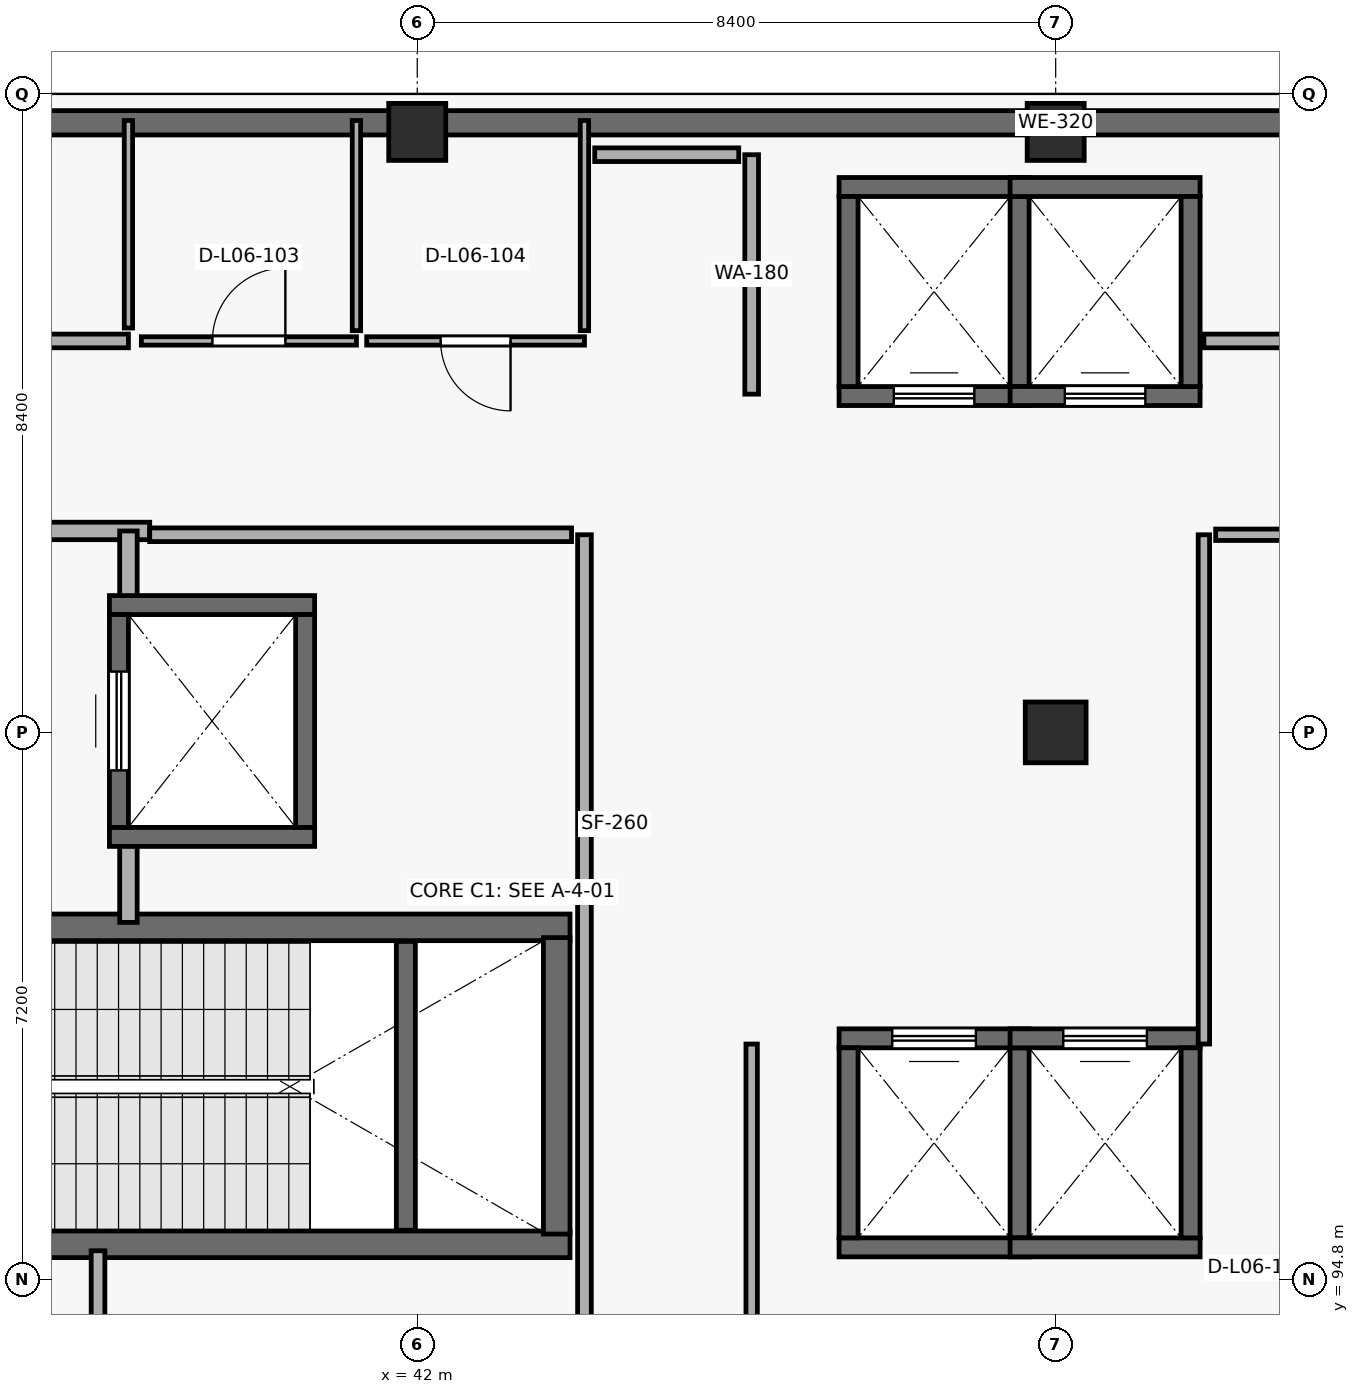
"""IFC4 building model, lengths in metres.
Left out: names, types, materials, properties, quantities, classifications, styles, units other than length and angle.
Written with IfcOpenShell. Run it as: python <this file> out.ifc"""

import sys

from ifc_helpers import new_model, si_unit, direction, frame, frame_2d, origin, origin_2d, place, context, subcontext, project, spatial, rectangle, extrude, element, fill, save


model = new_model("IFC4")
c1 = context("Model", 3, precision=1e-05, world=origin(), true_north=direction((0.0, 1.0)))
c2 = subcontext(c1, "Body", "Model", "MODEL_VIEW")
j1 = project(units=[si_unit("LENGTHUNIT", "METRE"), si_unit("PLANEANGLEUNIT", "RADIAN")], contexts=[c1])
p1 = place(None, origin())
s1 = spatial("IfcSite", under=j1, at=p1, CompositionType="ELEMENT")
p2 = place(p1, origin())
s2 = spatial("IfcBuilding", under=s1, at=p2, CompositionType="ELEMENT")
p3 = place(p2, frame((0.0, 0.0, 25.5)))
s3 = spatial("IfcBuildingStorey", under=s2, at=p3, CompositionType="ELEMENT", Elevation=25.5)
p4 = place(p3, frame((42.0, 109.9, 0.0), z_axis=(0.0, 0.0, 1.0), x_axis=(1.0, 0.0, 0.0)))
e1 = element("IfcColumn", 1, at=p4, inside=s3, PredefinedType="COLUMN", context=c2, shape_type="SweptSolid", body=[
    extrude(rectangle(XDim=0.75, YDim=0.75, at=origin_2d()), origin(), (0.0, 0.0, 1.0), 5.1),
])
p5 = place(p3, frame((50.4, 102.0, 0.0), z_axis=(0.0, 0.0, 1.0), x_axis=(1.0, 0.0, 0.0)))
e2 = element("IfcColumn", 2, at=p5, inside=s3, PredefinedType="COLUMN", context=c2, shape_type="SweptSolid", body=[
    extrude(rectangle(XDim=0.8, YDim=0.8, at=origin_2d()), origin(), (0.0, 0.0, 1.0), 5.1),
])
p6 = place(p3, frame((50.4, 109.9, 0.0), z_axis=(0.0, 0.0, 1.0), x_axis=(1.0, 0.0, 0.0)))
e3 = element("IfcColumn", 3, at=p6, inside=s3, PredefinedType="COLUMN", context=c2, shape_type="SweptSolid", body=[
    extrude(rectangle(XDim=0.75, YDim=0.75, at=origin_2d()), origin(), (0.0, 0.0, 1.0), 5.1),
])
p7 = place(p3, frame((33.6, 110.02, 0.0), z_axis=(0.0, 0.0, 1.0), x_axis=(1.0, 0.0, 0.0)))
e4 = element("IfcWall", 4, at=p7, inside=s3, PredefinedType="SOLIDWALL", context=c2, shape_type="SweptSolid", body=[
    extrude(rectangle(XDim=33.6, YDim=0.32, at=frame_2d((16.8, 0.0))), origin(), (0.0, 0.0, 1.0), 4.82),
])
p8 = place(p3, frame((34.79, 95.265, 0.0), z_axis=(0.0, 0.0, 1.0), x_axis=(1.0, 0.0, 0.0)))
e5 = element("IfcWall", 5, at=p8, inside=s3, PredefinedType="SHEAR", context=c2, shape_type="SweptSolid", body=[
    extrude(rectangle(XDim=9.22, YDim=0.35, at=frame_2d((4.61, 0.0))), origin(), (0.0, 0.0, 1.0), 4.82),
])
p9 = place(p8, frame((0.45, 0.0, 0.0)))
e6 = element("IfcOpeningElement", 6, at=p9, cuts=e5, PredefinedType="OPENING", context=c2, shape_type="SweptSolid", body=[
    extrude(rectangle(XDim=1.25, YDim=2.2, at=frame_2d((0.625, 1.1))), frame((0.0, 0.185, 0.0), z_axis=(0.0, -1.0, 0.0), x_axis=(1.0, 0.0, 0.0)), (0.0, 0.0, 1.0), 0.37),
])
p10 = place(p3, frame((44.01, 99.435, 0.0), z_axis=(0.0, 0.0, 1.0), x_axis=(-1.0, 0.0, 0.0)))
e7 = element("IfcWall", 7, at=p10, inside=s3, PredefinedType="SHEAR", context=c2, shape_type="SweptSolid", body=[
    extrude(rectangle(XDim=9.22, YDim=0.35, at=frame_2d((4.61, 0.0))), origin(), (0.0, 0.0, 1.0), 4.82),
])
p11 = place(p10, frame((7.72, 0.0, 0.0)))
e8 = element("IfcOpeningElement", 8, at=p11, cuts=e7, PredefinedType="OPENING", context=c2, shape_type="SweptSolid", body=[
    extrude(rectangle(XDim=1.2, YDim=2.2, at=frame_2d((0.6, 1.1))), frame((0.0, 0.185, 0.0), z_axis=(0.0, -1.0, 0.0), x_axis=(1.0, 0.0, 0.0)), (0.0, 0.0, 1.0), 0.37),
])
p12 = place(p3, frame((43.835, 99.3, 0.0), z_axis=(0.0, 0.0, 1.0), x_axis=(0.0, -1.0, 0.0)))
e9 = element("IfcWall", 9, at=p12, inside=s3, PredefinedType="SHEAR", context=c2, shape_type="SweptSolid", body=[
    extrude(rectangle(XDim=3.9, YDim=0.35, at=frame_2d((1.95, 0.0))), origin(), (0.0, 0.0, 1.0), 4.82),
])
p13 = place(p3, frame((41.85, 95.45, 0.0), z_axis=(0.0, 0.0, 1.0), x_axis=(0.0, 1.0, 0.0)))
e10 = element("IfcWall", 10, at=p13, inside=s3, PredefinedType="SHEAR", context=c2, shape_type="SweptSolid", body=[
    extrude(rectangle(XDim=3.8, YDim=0.25, at=frame_2d((1.9, 0.0))), origin(), (0.0, 0.0, 1.0), 2.37),
])
p14 = place(p3, frame((34.59, 104.65, 0.0), z_axis=(0.0, 0.0, 1.0), x_axis=(1.0, 0.0, 0.0)))
e11 = element("IfcWall", 11, at=p14, inside=s3, PredefinedType="PARTITIONING", context=c2, shape_type="SweptSolid", body=[
    extrude(rectangle(XDim=3.89, YDim=0.23, at=frame_2d((1.945, 0.0))), origin(), (0.0, 0.0, 1.0), 4.82),
])
p15 = place(p14, frame((1.15, 0.0, 0.0)))
e12 = element("IfcOpeningElement", 12, at=p15, cuts=e11, PredefinedType="OPENING", context=c2, shape_type="SweptSolid", body=[
    extrude(rectangle(XDim=1.2, YDim=2.2, at=frame_2d((0.6, 1.1))), frame((0.0, 0.125, 0.0), z_axis=(0.0, -1.0, 0.0), x_axis=(1.0, 0.0, 0.0)), (0.0, 0.0, 1.0), 0.25),
])
p16 = place(p3, frame((38.2, 104.65, 0.0), z_axis=(0.0, 0.0, 1.0), x_axis=(0.0, -1.0, 0.0)))
e13 = element("IfcWall", 13, at=p16, inside=s3, PredefinedType="PARTITIONING", context=c2, shape_type="SweptSolid", body=[
    extrude(rectangle(XDim=1.1, YDim=0.23, at=frame_2d((0.55, 0.0))), origin(), (0.0, 0.0, 1.0), 4.82),
])
p17 = place(p3, frame((38.2, 100.75, 0.0), z_axis=(0.0, 0.0, 1.0), x_axis=(0.0, -1.0, 0.0)))
e14 = element("IfcWall", 14, at=p17, inside=s3, PredefinedType="PARTITIONING", context=c2, shape_type="SweptSolid", body=[
    extrude(rectangle(XDim=1.25, YDim=0.23, at=frame_2d((0.625, 0.0))), origin(), (0.0, 0.0, 1.0), 4.82),
])
p18 = place(p3, frame((47.55, 95.225, 0.0), z_axis=(0.0, 0.0, 1.0), x_axis=(1.0, 0.0, 0.0)))
e15 = element("IfcWall", 15, at=p18, inside=s3, PredefinedType="SHEAR", context=c2, shape_type="SweptSolid", body=[
    extrude(rectangle(XDim=2.5, YDim=0.25, at=frame_2d((1.25, 0.0))), origin(), (0.0, 0.0, 1.0), 4.82),
])
p19 = place(p3, frame((50.05, 97.975, 0.0), z_axis=(0.0, 0.0, 1.0), x_axis=(-1.0, 0.0, 0.0)))
e16 = element("IfcWall", 16, at=p19, inside=s3, PredefinedType="SHEAR", context=c2, shape_type="SweptSolid", body=[
    extrude(rectangle(XDim=2.5, YDim=0.25, at=frame_2d((1.25, 0.0))), origin(), (0.0, 0.0, 1.0), 4.82),
])
p20 = place(p19, frame((0.7, 0.0, 0.0)))
e17 = element("IfcOpeningElement", 17, at=p20, cuts=e16, PredefinedType="OPENING", context=c2, shape_type="SweptSolid", body=[
    extrude(rectangle(XDim=1.1, YDim=2.2, at=frame_2d((0.55, 1.1))), frame((0.0, 0.135, 0.0), z_axis=(0.0, -1.0, 0.0), x_axis=(1.0, 0.0, 0.0)), (0.0, 0.0, 1.0), 0.27),
])
for number, where, z_axis, x_axis in (
    (18, (47.675, 95.35, 0.0), (0.0, 0.0, 1.0), (0.0, 1.0, 0.0)),
    (19, (49.925, 97.85, 0.0), (0.0, 0.0, 1.0), (0.0, -1.0, 0.0)),
    (20, (49.8, 95.225, 0.0), (0.0, 0.0, 1.0), (1.0, 0.0, 0.0)),
):
    element("IfcWall", number, at=place(p3, frame(where, z_axis=z_axis, x_axis=x_axis)), inside=s3, PredefinedType="SHEAR", context=c2, shape_type="SweptSolid", body=[
        extrude(rectangle(XDim=2.5, YDim=0.25, at=frame_2d((1.25, 0.0))), origin(), (0.0, 0.0, 1.0), 4.82),
    ])
p21 = place(p3, frame((52.3, 97.975, 0.0), z_axis=(0.0, 0.0, 1.0), x_axis=(-1.0, 0.0, 0.0)))
e21 = element("IfcWall", 21, at=p21, inside=s3, PredefinedType="SHEAR", context=c2, shape_type="SweptSolid", body=[
    extrude(rectangle(XDim=2.5, YDim=0.25, at=frame_2d((1.25, 0.0))), origin(), (0.0, 0.0, 1.0), 4.82),
])
p22 = place(p21, frame((0.7, 0.0, 0.0)))
e22 = element("IfcOpeningElement", 22, at=p22, cuts=e21, PredefinedType="OPENING", context=c2, shape_type="SweptSolid", body=[
    extrude(rectangle(XDim=1.1, YDim=2.2, at=frame_2d((0.55, 1.1))), frame((0.0, 0.135, 0.0), z_axis=(0.0, -1.0, 0.0), x_axis=(1.0, 0.0, 0.0)), (0.0, 0.0, 1.0), 0.27),
])
p23 = place(p3, frame((52.175, 97.85, 0.0), z_axis=(0.0, 0.0, 1.0), x_axis=(0.0, -1.0, 0.0)))
e23 = element("IfcWall", 23, at=p23, inside=s3, PredefinedType="SHEAR", context=c2, shape_type="SweptSolid", body=[
    extrude(rectangle(XDim=2.5, YDim=0.25, at=frame_2d((1.25, 0.0))), origin(), (0.0, 0.0, 1.0), 4.82),
])
p24 = place(p3, frame((47.55, 106.425, 0.0), z_axis=(0.0, 0.0, 1.0), x_axis=(1.0, 0.0, 0.0)))
e24 = element("IfcWall", 24, at=p24, inside=s3, PredefinedType="SHEAR", context=c2, shape_type="SweptSolid", body=[
    extrude(rectangle(XDim=2.5, YDim=0.25, at=frame_2d((1.25, 0.0))), origin(), (0.0, 0.0, 1.0), 4.82),
])
p25 = place(p24, frame((0.72, 0.0, 0.0)))
e25 = element("IfcOpeningElement", 25, at=p25, cuts=e24, PredefinedType="OPENING", context=c2, shape_type="SweptSolid", body=[
    extrude(rectangle(XDim=1.06, YDim=2.2, at=frame_2d((0.53, 1.1))), frame((0.0, 0.135, 0.0), z_axis=(0.0, -1.0, 0.0), x_axis=(1.0, 0.0, 0.0)), (0.0, 0.0, 1.0), 0.27),
])
for number, where, z_axis, x_axis in (
    (26, (50.05, 109.175, 0.0), (0.0, 0.0, 1.0), (-1.0, 0.0, 0.0)),
    (27, (47.675, 106.55, 0.0), (0.0, 0.0, 1.0), (0.0, 1.0, 0.0)),
    (28, (49.925, 109.05, 0.0), (0.0, 0.0, 1.0), (0.0, -1.0, 0.0)),
):
    element("IfcWall", number, at=place(p3, frame(where, z_axis=z_axis, x_axis=x_axis)), inside=s3, PredefinedType="SHEAR", context=c2, shape_type="SweptSolid", body=[
        extrude(rectangle(XDim=2.5, YDim=0.25, at=frame_2d((1.25, 0.0))), origin(), (0.0, 0.0, 1.0), 4.82),
    ])
p26 = place(p3, frame((49.8, 106.425, 0.0), z_axis=(0.0, 0.0, 1.0), x_axis=(1.0, 0.0, 0.0)))
e29 = element("IfcWall", 29, at=p26, inside=s3, PredefinedType="SHEAR", context=c2, shape_type="SweptSolid", body=[
    extrude(rectangle(XDim=2.5, YDim=0.25, at=frame_2d((1.25, 0.0))), origin(), (0.0, 0.0, 1.0), 4.82),
])
p27 = place(p26, frame((0.72, 0.0, 0.0)))
e30 = element("IfcOpeningElement", 30, at=p27, cuts=e29, PredefinedType="OPENING", context=c2, shape_type="SweptSolid", body=[
    extrude(rectangle(XDim=1.06, YDim=2.2, at=frame_2d((0.53, 1.1))), frame((0.0, 0.135, 0.0), z_axis=(0.0, -1.0, 0.0), x_axis=(1.0, 0.0, 0.0)), (0.0, 0.0, 1.0), 0.27),
])
for number, where, z_axis, x_axis in (
    (31, (52.3, 109.175, 0.0), (0.0, 0.0, 1.0), (-1.0, 0.0, 0.0)),
    (32, (52.175, 109.05, 0.0), (0.0, 0.0, 1.0), (0.0, -1.0, 0.0)),
):
    element("IfcWall", number, at=place(p3, frame(where, z_axis=z_axis, x_axis=x_axis)), inside=s3, PredefinedType="SHEAR", context=c2, shape_type="SweptSolid", body=[
        extrude(rectangle(XDim=2.5, YDim=0.25, at=frame_2d((1.25, 0.0))), origin(), (0.0, 0.0, 1.0), 4.82),
    ])
for number, where, z_axis, x_axis in (
    (33, (37.95, 100.625, 0.0), (0.0, 0.0, 1.0), (1.0, 0.0, 0.0)),
    (34, (40.65, 103.675, 0.0), (0.0, 0.0, 1.0), (-1.0, 0.0, 0.0)),
):
    element("IfcWall", number, at=place(p3, frame(where, z_axis=z_axis, x_axis=x_axis)), inside=s3, PredefinedType="SHEAR", context=c2, shape_type="SweptSolid", body=[
        extrude(rectangle(XDim=2.7, YDim=0.25, at=frame_2d((1.35, 0.0))), origin(), (0.0, 0.0, 1.0), 4.82),
    ])
p28 = place(p3, frame((38.075, 100.75, 0.0), z_axis=(0.0, 0.0, 1.0), x_axis=(0.0, 1.0, 0.0)))
e35 = element("IfcWall", 35, at=p28, inside=s3, PredefinedType="SHEAR", context=c2, shape_type="SweptSolid", body=[
    extrude(rectangle(XDim=2.8, YDim=0.25, at=frame_2d((1.4, 0.0))), origin(), (0.0, 0.0, 1.0), 4.82),
])
p29 = place(p28, frame((0.75, 0.0, 0.0)))
e36 = element("IfcOpeningElement", 36, at=p29, cuts=e35, PredefinedType="OPENING", context=c2, shape_type="SweptSolid", body=[
    extrude(rectangle(XDim=1.3, YDim=2.25, at=frame_2d((0.65, 1.125))), frame((0.0, 0.135, 0.0), z_axis=(0.0, -1.0, 0.0), x_axis=(1.0, 0.0, 0.0)), (0.0, 0.0, 1.0), 0.27),
])
p30 = place(p3, frame((40.525, 103.55, 0.0), z_axis=(0.0, 0.0, 1.0), x_axis=(0.0, -1.0, 0.0)))
e37 = element("IfcWall", 37, at=p30, inside=s3, PredefinedType="SHEAR", context=c2, shape_type="SweptSolid", body=[
    extrude(rectangle(XDim=2.8, YDim=0.25, at=frame_2d((1.4, 0.0))), origin(), (0.0, 0.0, 1.0), 4.82),
])
p31 = place(p3, frame((64.35, 107.15, 0.0), z_axis=(0.0, 0.0, 1.0), x_axis=(-1.0, 0.0, 0.0)))
e38 = element("IfcWall", 38, at=p31, inside=s3, PredefinedType="PARTITIONING", context=c2, shape_type="SweptSolid", body=[
    extrude(rectangle(XDim=12.0, YDim=0.18, at=frame_2d((6.0, 0.0))), origin(), (0.0, 0.0, 1.0), 4.82),
])
p32 = place(p3, frame((44.2, 104.6, 0.0), z_axis=(0.0, 0.0, 1.0), x_axis=(0.0, -1.0, 0.0)))
e39 = element("IfcWall", 39, at=p32, inside=s3, PredefinedType="PARTITIONING", context=c2, shape_type="SweptSolid", body=[
    extrude(rectangle(XDim=10.75, YDim=0.18, at=frame_2d((5.375, 0.0))), origin(), (0.0, 0.0, 1.0), 4.82),
])
p33 = place(p3, frame((52.35, 97.9, 0.0), z_axis=(0.0, 0.0, 1.0), x_axis=(0.0, 1.0, 0.0)))
e40 = element("IfcWall", 40, at=p33, inside=s3, PredefinedType="PARTITIONING", context=c2, shape_type="SweptSolid", body=[
    extrude(rectangle(XDim=6.7, YDim=0.15, at=frame_2d((3.35, 0.0))), origin(), (0.0, 0.0, 1.0), 4.82),
])
p34 = place(p3, frame((38.48, 104.6, 0.0), z_axis=(0.0, 0.0, 1.0), x_axis=(1.0, 0.0, 0.0)))
e41 = element("IfcWall", 41, at=p34, inside=s3, PredefinedType="PARTITIONING", context=c2, shape_type="SweptSolid", body=[
    extrude(rectangle(XDim=5.55, YDim=0.18, at=frame_2d((2.775, 0.0))), origin(), (0.0, 0.0, 1.0), 4.82),
])
p35 = place(p3, frame((46.4, 94.005, 0.0), z_axis=(0.0, 0.0, 1.0), x_axis=(0.0, 1.0, 0.0)))
e42 = element("IfcWall", 42, at=p35, inside=s3, PredefinedType="PARTITIONING", context=c2, shape_type="SweptSolid", body=[
    extrude(rectangle(XDim=3.895, YDim=0.15, at=frame_2d((1.948, 0.0))), origin(), (0.0, 0.0, 1.0), 4.82),
])
p36 = place(p3, frame((38.2, 107.15, 0.0), z_axis=(0.0, 0.0, 1.0), x_axis=(-1.0, 0.0, 0.0)))
e43 = element("IfcWall", 43, at=p36, inside=s3, PredefinedType="PARTITIONING", context=c2, shape_type="SweptSolid", body=[
    extrude(rectangle(XDim=3.6, YDim=0.18, at=frame_2d((1.8, 0.0))), origin(), (0.0, 0.0, 1.0), 4.82),
])
p37 = place(p3, frame((46.4, 106.45, 0.0), z_axis=(0.0, 0.0, 1.0), x_axis=(0.0, 1.0, 0.0)))
e44 = element("IfcWall", 44, at=p37, inside=s3, PredefinedType="PARTITIONING", context=c2, shape_type="SweptSolid", body=[
    extrude(rectangle(XDim=3.15, YDim=0.18, at=frame_2d((1.575, 0.0))), origin(), (0.0, 0.0, 1.0), 4.82),
])
p38 = place(p3, frame((41.2, 107.15, 0.0), z_axis=(0.0, 0.0, 1.0), x_axis=(-1.0, 0.0, 0.0)))
e45 = element("IfcWall", 45, at=p38, inside=s3, PredefinedType="PARTITIONING", context=c2, shape_type="SweptSolid", body=[
    extrude(rectangle(XDim=2.83, YDim=0.11, at=frame_2d((1.415, 0.0))), origin(), (0.0, 0.0, 1.0), 4.82),
])
p39 = place(p38, frame((0.935, 0.0, 0.0)))
e46 = element("IfcOpeningElement", 46, at=p39, cuts=e45, PredefinedType="OPENING", context=c2, shape_type="SweptSolid", body=[
    extrude(rectangle(XDim=0.96, YDim=2.14, at=frame_2d((0.48, 1.07))), frame((0.0, 0.065, 0.0), z_axis=(0.0, -1.0, 0.0), x_axis=(1.0, 0.0, 0.0)), (0.0, 0.0, 1.0), 0.13),
])
p40 = place(p3, frame((44.2, 107.15, 0.0), z_axis=(0.0, 0.0, 1.0), x_axis=(-1.0, 0.0, 0.0)))
e47 = element("IfcWall", 47, at=p40, inside=s3, PredefinedType="PARTITIONING", context=c2, shape_type="SweptSolid", body=[
    extrude(rectangle(XDim=2.865, YDim=0.11, at=frame_2d((1.433, 0.0))), origin(), (0.0, 0.0, 1.0), 4.82),
])
p41 = place(p40, frame((0.972, 0.0, 0.0)))
e48 = element("IfcOpeningElement", 48, at=p41, cuts=e47, PredefinedType="OPENING", context=c2, shape_type="SweptSolid", body=[
    extrude(rectangle(XDim=0.92, YDim=2.12, at=frame_2d((0.46, 1.06))), frame((0.0, 0.065, 0.0), z_axis=(0.0, -1.0, 0.0), x_axis=(1.0, 0.0, 0.0)), (0.0, 0.0, 1.0), 0.13),
])
p42 = place(p3, frame((41.2, 110.05, 0.0), z_axis=(0.0, 0.0, 1.0), x_axis=(0.0, -1.0, 0.0)))
e49 = element("IfcWall", 49, at=p42, inside=s3, PredefinedType="PARTITIONING", context=c2, shape_type="SweptSolid", body=[
    extrude(rectangle(XDim=2.765, YDim=0.11, at=frame_2d((1.383, 0.0))), origin(), (0.0, 0.0, 1.0), 4.82),
])
p43 = place(p3, frame((38.2, 107.32, 0.0), z_axis=(0.0, 0.0, 1.0), x_axis=(0.0, 1.0, 0.0)))
e50 = element("IfcWall", 50, at=p43, inside=s3, PredefinedType="PARTITIONING", context=c2, shape_type="SweptSolid", body=[
    extrude(rectangle(XDim=2.73, YDim=0.11, at=frame_2d((1.365, 0.0))), origin(), (0.0, 0.0, 1.0), 4.82),
])
p44 = place(p3, frame((44.2, 110.05, 0.0), z_axis=(0.0, 0.0, 1.0), x_axis=(0.0, -1.0, 0.0)))
e51 = element("IfcWall", 51, at=p44, inside=s3, PredefinedType="PARTITIONING", context=c2, shape_type="SweptSolid", body=[
    extrude(rectangle(XDim=2.765, YDim=0.11, at=frame_2d((1.383, 0.0))), origin(), (0.0, 0.0, 1.0), 4.82),
])
p45 = place(p3, frame((52.505, 104.6, 0.0), z_axis=(0.0, 0.0, 1.0), x_axis=(1.0, 0.0, 0.0)))
e52 = element("IfcWall", 52, at=p45, inside=s3, PredefinedType="PARTITIONING", context=c2, shape_type="SweptSolid", body=[
    extrude(rectangle(XDim=2.575, YDim=0.15, at=frame_2d((1.288, 0.0))), origin(), (0.0, 0.0, 1.0), 4.82),
])
p46 = place(p3, frame((46.23, 109.6, 0.0), z_axis=(0.0, 0.0, 1.0), x_axis=(-1.0, 0.0, 0.0)))
e53 = element("IfcWall", 53, at=p46, inside=s3, PredefinedType="PARTITIONING", context=c2, shape_type="SweptSolid", body=[
    extrude(rectangle(XDim=1.895, YDim=0.18, at=frame_2d((0.948, 0.0))), origin(), (0.0, 0.0, 1.0), 3.9),
])
p47 = place(p3, frame((37.8, 94.02, 0.0), z_axis=(0.0, 0.0, 1.0), x_axis=(0.0, 1.0, 0.0)))
e54 = element("IfcWall", 54, at=p47, inside=s3, PredefinedType="PARTITIONING", context=c2, shape_type="SweptSolid", body=[
    extrude(rectangle(XDim=1.16, YDim=0.18, at=frame_2d((0.58, 0.0))), origin(), (0.0, 0.0, 1.0), 4.82),
])
p48 = place(p20, origin())
e55 = element("IfcDoor", 55, at=p48, inside=s3, OperationType="SLIDING_TO_LEFT", PredefinedType="DOOR", context=c2, shape_type="SweptSolid", body=[
    extrude(rectangle(XDim=1.1, YDim=2.2, at=frame_2d((0.55, 1.1))), frame((0.0, 0.025, 0.0), z_axis=(0.0, -1.0, 0.0), x_axis=(1.0, 0.0, 0.0)), (0.0, 0.0, 1.0), 0.05),
])
fill(e17, e55)
p49 = place(p22, origin())
e56 = element("IfcDoor", 56, at=p49, inside=s3, OperationType="SLIDING_TO_LEFT", PredefinedType="DOOR", context=c2, shape_type="SweptSolid", body=[
    extrude(rectangle(XDim=1.1, YDim=2.2, at=frame_2d((0.55, 1.1))), frame((0.0, 0.025, 0.0), z_axis=(0.0, -1.0, 0.0), x_axis=(1.0, 0.0, 0.0)), (0.0, 0.0, 1.0), 0.05),
])
fill(e22, e56)
p50 = place(p25, origin())
e57 = element("IfcDoor", 57, at=p50, inside=s3, OperationType="SLIDING_TO_LEFT", PredefinedType="DOOR", context=c2, shape_type="SweptSolid", body=[
    extrude(rectangle(XDim=1.06, YDim=2.2, at=frame_2d((0.53, 1.1))), frame((0.0, 0.025, 0.0), z_axis=(0.0, -1.0, 0.0), x_axis=(1.0, 0.0, 0.0)), (0.0, 0.0, 1.0), 0.05),
])
fill(e25, e57)
p51 = place(p27, origin())
e58 = element("IfcDoor", 58, at=p51, inside=s3, OperationType="SLIDING_TO_LEFT", PredefinedType="DOOR", context=c2, shape_type="SweptSolid", body=[
    extrude(rectangle(XDim=1.06, YDim=2.2, at=frame_2d((0.53, 1.1))), frame((0.0, 0.025, 0.0), z_axis=(0.0, -1.0, 0.0), x_axis=(1.0, 0.0, 0.0)), (0.0, 0.0, 1.0), 0.05),
])
fill(e30, e58)
p52 = place(p29, origin())
e59 = element("IfcDoor", 59, at=p52, inside=s3, OperationType="SLIDING_TO_LEFT", PredefinedType="DOOR", context=c2, shape_type="SweptSolid", body=[
    extrude(rectangle(XDim=1.3, YDim=2.25, at=frame_2d((0.65, 1.125))), frame((0.0, 0.025, 0.0), z_axis=(0.0, -1.0, 0.0), x_axis=(1.0, 0.0, 0.0)), (0.0, 0.0, 1.0), 0.05),
])
fill(e36, e59)
p53 = place(p39, origin())
e60 = element("IfcDoor", 60, at=p53, inside=s3, OperationType="SINGLE_SWING_RIGHT", PredefinedType="DOOR", context=c2, shape_type="SweptSolid", body=[
    extrude(rectangle(XDim=0.96, YDim=2.14, at=frame_2d((0.48, 1.07))), frame((0.0, 0.025, 0.0), z_axis=(0.0, -1.0, 0.0), x_axis=(1.0, 0.0, 0.0)), (0.0, 0.0, 1.0), 0.05),
])
fill(e46, e60)
p54 = place(p41, origin())
e61 = element("IfcDoor", 61, at=p54, inside=s3, OperationType="SINGLE_SWING_LEFT", PredefinedType="DOOR", context=c2, shape_type="SweptSolid", body=[
    extrude(rectangle(XDim=0.92, YDim=2.12, at=frame_2d((0.46, 1.06))), frame((0.0, 0.025, 0.0), z_axis=(0.0, -1.0, 0.0), x_axis=(1.0, 0.0, 0.0)), (0.0, 0.0, 1.0), 0.05),
])
fill(e48, e61)
save(model, sys.argv[1])
